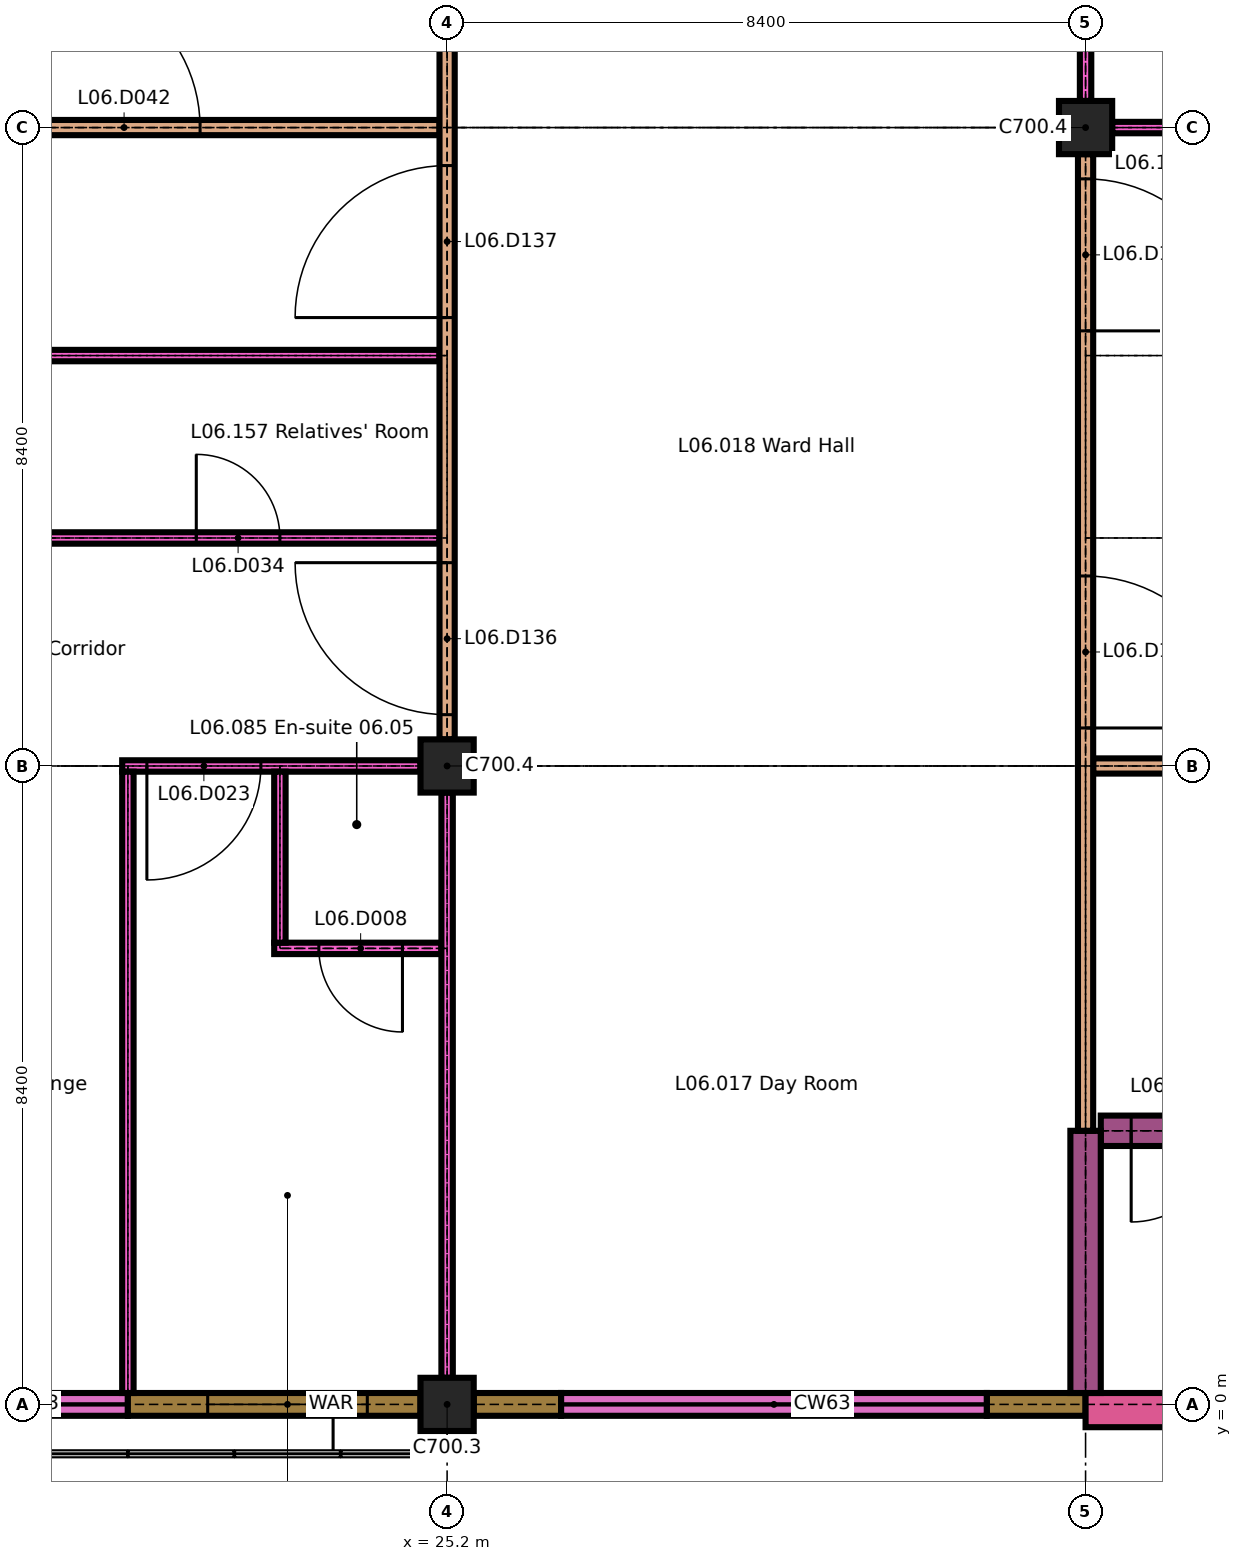
"""IFC4 building model, lengths in metres.
Left out: names, types, materials, properties, quantities, classifications, styles, units other than length and angle.
Written with IfcOpenShell. Run it as: python <this file> out.ifc"""

import sys

from ifc_helpers import new_model, si_unit, direction, frame, frame_2d, origin, origin_2d, place, context, subcontext, project, spatial, rectangle, extrude, element, fill, save


model = new_model("IFC4")
c1 = context("Model", 3, precision=1e-05, world=origin(), true_north=direction((0.0, 1.0)))
c2 = subcontext(c1, "Body", "Model", "MODEL_VIEW")
j1 = project(units=[si_unit("LENGTHUNIT", "METRE"), si_unit("PLANEANGLEUNIT", "RADIAN")], contexts=[c1])
p1 = place(None, origin())
s1 = spatial("IfcSite", under=j1, at=p1, CompositionType="ELEMENT")
p2 = place(p1, origin())
s2 = spatial("IfcBuilding", under=s1, at=p2, CompositionType="ELEMENT")
p3 = place(p2, frame((0.0, 0.0, 26.1)))
s3 = spatial("IfcBuildingStorey", under=s2, at=p3, CompositionType="ELEMENT", Elevation=26.1)
p4 = place(p3, frame((25.2, 0.0, 0.0), z_axis=(0.0, 0.0, 1.0), x_axis=(1.0, 0.0, 0.0)))
e1 = element("IfcColumn", 1, at=p4, inside=s3, PredefinedType="COLUMN", context=c2, shape_type="SweptSolid", body=[
    extrude(rectangle(XDim=0.7, YDim=0.7, at=origin_2d()), origin(), (0.0, 0.0, 1.0), 3.2),
])
for number, where, z_axis, x_axis in (
    (2, (25.2, 8.4, 0.0), (0.0, 0.0, 1.0), (1.0, 0.0, 0.0)),
    (3, (33.6, 16.8, 0.0), (0.0, 0.0, 1.0), (1.0, 0.0, 0.0)),
):
    element("IfcColumn", number, at=place(p3, frame(where, z_axis=z_axis, x_axis=x_axis)), inside=s3, PredefinedType="COLUMN", context=c2, shape_type="SweptSolid", body=[
        extrude(rectangle(XDim=0.7, YDim=0.7, at=origin_2d()), origin(), (0.0, 0.0, 1.0), 3.3),
    ])
p5 = place(p3, frame((17.15, 0.0, 0.0), z_axis=(0.0, 0.0, 1.0), x_axis=(1.0, 0.0, 0.0)))
e4 = element("IfcWall", 4, at=p5, inside=s3, PredefinedType="SOLIDWALL", context=c2, shape_type="SweptSolid", body=[
    extrude(rectangle(XDim=3.85, YDim=0.3, at=frame_2d((1.925, 0.0))), origin(), (0.0, 0.0, 1.0), 0.6),
])
p6 = place(p3, frame((21.0, 0.0, 0.0), z_axis=(0.0, 0.0, 1.0), x_axis=(1.0, 0.0, 0.0)))
e5 = element("IfcWall", 5, at=p6, inside=s3, PredefinedType="SOLIDWALL", context=c2, shape_type="SweptSolid", body=[
    extrude(rectangle(XDim=3.85, YDim=0.3, at=frame_2d((1.925, 0.0))), origin(), (0.0, 0.0, 1.0), 2.9),
])
p7 = place(p6, frame((1.05, 0.0, 0.9)))
e6 = element("IfcOpeningElement", 6, at=p7, cuts=e5, PredefinedType="OPENING", context=c2, shape_type="SweptSolid", body=[
    extrude(rectangle(XDim=2.1, YDim=1.5, at=frame_2d((1.05, 0.75))), frame((0.0, 0.16, 0.0), z_axis=(0.0, -1.0, 0.0), x_axis=(1.0, 0.0, 0.0)), (0.0, 0.0, 1.0), 0.32),
])
p8 = place(p3, frame((25.55, 0.0, 0.0), z_axis=(0.0, 0.0, 1.0), x_axis=(1.0, 0.0, 0.0)))
e7 = element("IfcWall", 7, at=p8, inside=s3, PredefinedType="SOLIDWALL", context=c2, shape_type="SweptSolid", body=[
    extrude(rectangle(XDim=1.15, YDim=0.3, at=frame_2d((0.575, 0.0))), origin(), (0.0, 0.0, 1.0), 2.9),
])
p9 = place(p3, frame((32.3, 0.0, 0.0), z_axis=(0.0, 0.0, 1.0), x_axis=(1.0, 0.0, 0.0)))
e8 = element("IfcWall", 8, at=p9, inside=s3, PredefinedType="SOLIDWALL", context=c2, shape_type="SweptSolid", body=[
    extrude(rectangle(XDim=1.3, YDim=0.3, at=frame_2d((0.65, 0.0))), origin(), (0.0, 0.0, 1.0), 2.9),
])
p10 = place(p3, frame((26.7, 0.0, 0.0), z_axis=(0.0, 0.0, 1.0), x_axis=(1.0, 0.0, 0.0)))
e9 = element("IfcWall", 9, at=p10, inside=s3, PredefinedType="SOLIDWALL", context=c2, shape_type="SweptSolid", body=[
    extrude(rectangle(XDim=5.6, YDim=0.3, at=frame_2d((2.8, 0.0))), origin(), (0.0, 0.0, 1.0), 0.6),
])
p11 = place(p3, frame((33.6, -0.075, 0.0), z_axis=(0.0, 0.0, 1.0), x_axis=(1.0, 0.0, 0.0)))
e10 = element("IfcWall", 10, at=p11, inside=s3, PredefinedType="SOLIDWALL", context=c2, shape_type="SweptSolid", body=[
    extrude(rectangle(XDim=3.15, YDim=0.45, at=frame_2d((1.575, 0.0))), origin(), (0.0, 0.0, 1.0), 3.3),
])
p12 = place(p3, frame((33.8, 3.6, 0.0), z_axis=(0.0, 0.0, 1.0), x_axis=(1.0, 0.0, 0.0)))
e11 = element("IfcWall", 11, at=p12, inside=s3, PredefinedType="SHEAR", context=c2, shape_type="SweptSolid", body=[
    extrude(rectangle(XDim=8.05, YDim=0.4, at=frame_2d((4.025, 0.0))), origin(), (0.0, 0.0, 1.0), 3.3),
])
p13 = place(p12, frame((0.4, 0.0, 0.0)))
e12 = element("IfcOpeningElement", 12, at=p13, cuts=e11, PredefinedType="OPENING", context=c2, shape_type="SweptSolid", body=[
    extrude(rectangle(XDim=1.2, YDim=2.1, at=frame_2d((0.6, 1.05))), frame((0.0, 0.21, 0.0), z_axis=(0.0, -1.0, 0.0), x_axis=(1.0, 0.0, 0.0)), (0.0, 0.0, 1.0), 0.42),
])
p14 = place(p3, frame((22.925, 6.0, 0.0), z_axis=(0.0, 0.0, 1.0), x_axis=(1.0, 0.0, 0.0)))
e13 = element("IfcWall", 13, at=p14, inside=s3, PredefinedType="PARTITIONING", context=c2, shape_type="SweptSolid", body=[
    extrude(rectangle(XDim=2.2, YDim=0.15, at=frame_2d((1.1, 0.0))), origin(), (0.0, 0.0, 1.0), 3.3),
])
p15 = place(p14, frame((0.587, 0.0, 0.0)))
e14 = element("IfcOpeningElement", 14, at=p15, cuts=e13, PredefinedType="OPENING", context=c2, shape_type="SweptSolid", body=[
    extrude(rectangle(XDim=1.1, YDim=2.1, at=frame_2d((0.55, 1.05))), frame((0.0, 0.085, 0.0), z_axis=(0.0, -1.0, 0.0), x_axis=(1.0, 0.0, 0.0)), (0.0, 0.0, 1.0), 0.17),
])
p16 = place(p3, frame((20.925, 8.4, 0.0), z_axis=(0.0, 0.0, 1.0), x_axis=(1.0, 0.0, 0.0)))
e15 = element("IfcWall", 15, at=p16, inside=s3, PredefinedType="PARTITIONING", context=c2, shape_type="SweptSolid", body=[
    extrude(rectangle(XDim=3.925, YDim=0.15, at=frame_2d((1.962, 0.0))), origin(), (0.0, 0.0, 1.0), 3.3),
])
p17 = place(p16, frame((0.325, 0.0, 0.0)))
e16 = element("IfcOpeningElement", 16, at=p17, cuts=e15, PredefinedType="OPENING", context=c2, shape_type="SweptSolid", body=[
    extrude(rectangle(XDim=1.5, YDim=2.4, at=frame_2d((0.75, 1.2))), frame((0.0, 0.085, 0.0), z_axis=(0.0, -1.0, 0.0), x_axis=(1.0, 0.0, 0.0)), (0.0, 0.0, 1.0), 0.17),
])
p18 = place(p3, frame((33.7, 8.4, 0.0), z_axis=(0.0, 0.0, 1.0), x_axis=(1.0, 0.0, 0.0)))
e17 = element("IfcWall", 17, at=p18, inside=s3, PredefinedType="PARTITIONING", context=c2, shape_type="SweptSolid", body=[
    extrude(rectangle(XDim=8.15, YDim=0.2, at=frame_2d((4.075, 0.0))), origin(), (0.0, 0.0, 1.0), 3.3),
])
p19 = place(p18, frame((3.075, 0.0, 0.0)))
e18 = element("IfcOpeningElement", 18, at=p19, cuts=e17, PredefinedType="OPENING", context=c2, shape_type="SweptSolid", body=[
    extrude(rectangle(XDim=2.0, YDim=2.4, at=frame_2d((1.0, 1.2))), frame((0.0, 0.11, 0.0), z_axis=(0.0, -1.0, 0.0), x_axis=(1.0, 0.0, 0.0)), (0.0, 0.0, 1.0), 0.22),
])
p20 = place(p3, frame((19.725, 11.4, 0.0), z_axis=(0.0, 0.0, 1.0), x_axis=(1.0, 0.0, 0.0)))
e19 = element("IfcWall", 19, at=p20, inside=s3, PredefinedType="PARTITIONING", context=c2, shape_type="SweptSolid", body=[
    extrude(rectangle(XDim=5.375, YDim=0.15, at=frame_2d((2.688, 0.0))), origin(), (0.0, 0.0, 1.0), 3.3),
])
p21 = place(p20, frame((2.175, 0.0, 0.0)))
e20 = element("IfcOpeningElement", 20, at=p21, cuts=e19, PredefinedType="OPENING", context=c2, shape_type="SweptSolid", body=[
    extrude(rectangle(XDim=1.1, YDim=2.1, at=frame_2d((0.55, 1.05))), frame((0.0, 0.085, 0.0), z_axis=(0.0, -1.0, 0.0), x_axis=(1.0, 0.0, 0.0)), (0.0, 0.0, 1.0), 0.17),
])
p22 = place(p3, frame((11.325, 13.8, 0.0), z_axis=(0.0, 0.0, 1.0), x_axis=(1.0, 0.0, 0.0)))
e21 = element("IfcWall", 21, at=p22, inside=s3, PredefinedType="PARTITIONING", context=c2, shape_type="SweptSolid", body=[
    extrude(rectangle(XDim=13.775, YDim=0.15, at=frame_2d((6.888, 0.0))), origin(), (0.0, 0.0, 1.0), 3.3),
])
p23 = place(p3, frame((16.7, 16.8, 0.0), z_axis=(0.0, 0.0, 1.0), x_axis=(1.0, 0.0, 0.0)))
e22 = element("IfcWall", 22, at=p23, inside=s3, PredefinedType="PARTITIONING", context=c2, shape_type="SweptSolid", body=[
    extrude(rectangle(XDim=8.4, YDim=0.2, at=frame_2d((4.2, 0.0))), origin(), (0.0, 0.0, 1.0), 3.3),
])
p24 = place(p23, frame((3.25, 0.0, 0.0)))
e23 = element("IfcOpeningElement", 23, at=p24, cuts=e22, PredefinedType="OPENING", context=c2, shape_type="SweptSolid", body=[
    extrude(rectangle(XDim=2.0, YDim=2.4, at=frame_2d((1.0, 1.2))), frame((0.0, 0.11, 0.0), z_axis=(0.0, -1.0, 0.0), x_axis=(1.0, 0.0, 0.0)), (0.0, 0.0, 1.0), 0.22),
])
p25 = place(p3, frame((33.95, 16.8, 0.0), z_axis=(0.0, 0.0, 1.0), x_axis=(1.0, 0.0, 0.0)))
e24 = element("IfcWall", 24, at=p25, inside=s3, PredefinedType="PARTITIONING", context=c2, shape_type="SweptSolid", body=[
    extrude(rectangle(XDim=7.675, YDim=0.15, at=frame_2d((3.837, 0.0))), origin(), (0.0, 0.0, 1.0), 3.3),
])
p26 = place(p25, frame((2.1, 0.0, 0.0)))
e25 = element("IfcOpeningElement", 25, at=p26, cuts=e24, PredefinedType="OPENING", context=c2, shape_type="SweptSolid", body=[
    extrude(rectangle(XDim=1.5, YDim=2.4, at=frame_2d((0.75, 1.2))), frame((0.0, 0.085, 0.0), z_axis=(0.0, -1.0, 0.0), x_axis=(1.0, 0.0, 0.0)), (0.0, 0.0, 1.0), 0.17),
])
p27 = place(p25, frame((4.1, 0.0, 0.0)))
e26 = element("IfcOpeningElement", 26, at=p27, cuts=e24, PredefinedType="OPENING", context=c2, shape_type="SweptSolid", body=[
    extrude(rectangle(XDim=1.5, YDim=2.4, at=frame_2d((0.75, 1.2))), frame((0.0, 0.085, 0.0), z_axis=(0.0, -1.0, 0.0), x_axis=(1.0, 0.0, 0.0)), (0.0, 0.0, 1.0), 0.17),
])
p28 = place(p3, frame((21.0, 0.15, 0.0), z_axis=(0.0, 0.0, 1.0), x_axis=(0.0, 1.0, 0.0)))
e27 = element("IfcWall", 27, at=p28, inside=s3, PredefinedType="PARTITIONING", context=c2, shape_type="SweptSolid", body=[
    extrude(rectangle(XDim=8.175, YDim=0.15, at=frame_2d((4.087, 0.0))), origin(), (0.0, 0.0, 1.0), 3.3),
])
p29 = place(p3, frame((23.0, 6.075, 0.0), z_axis=(0.0, 0.0, 1.0), x_axis=(0.0, 1.0, 0.0)))
e28 = element("IfcWall", 28, at=p29, inside=s3, PredefinedType="PARTITIONING", context=c2, shape_type="SweptSolid", body=[
    extrude(rectangle(XDim=2.25, YDim=0.15, at=frame_2d((1.125, 0.0))), origin(), (0.0, 0.0, 1.0), 3.3),
])
p30 = place(p3, frame((25.2, 0.35, 0.0), z_axis=(0.0, 0.0, 1.0), x_axis=(0.0, 1.0, 0.0)))
e29 = element("IfcWall", 29, at=p30, inside=s3, PredefinedType="PARTITIONING", context=c2, shape_type="SweptSolid", body=[
    extrude(rectangle(XDim=7.7, YDim=0.15, at=frame_2d((3.85, 0.0))), origin(), (0.0, 0.0, 1.0), 3.3),
])
p31 = place(p3, frame((25.2, 8.75, 0.0), z_axis=(0.0, 0.0, 1.0), x_axis=(0.0, 1.0, 0.0)))
e30 = element("IfcWall", 30, at=p31, inside=s3, PredefinedType="PARTITIONING", context=c2, shape_type="SweptSolid", body=[
    extrude(rectangle(XDim=12.85, YDim=0.2, at=frame_2d((6.425, 0.0))), origin(), (0.0, 0.0, 1.0), 3.3),
])
p32 = place(p31, frame((0.325, 0.0, 0.0)))
e31 = element("IfcOpeningElement", 31, at=p32, cuts=e30, PredefinedType="OPENING", context=c2, shape_type="SweptSolid", body=[
    extrude(rectangle(XDim=2.0, YDim=2.4, at=frame_2d((1.0, 1.2))), frame((0.0, 0.11, 0.0), z_axis=(0.0, -1.0, 0.0), x_axis=(1.0, 0.0, 0.0)), (0.0, 0.0, 1.0), 0.22),
])
p33 = place(p31, frame((5.55, 0.0, 0.0)))
e32 = element("IfcOpeningElement", 32, at=p33, cuts=e30, PredefinedType="OPENING", context=c2, shape_type="SweptSolid", body=[
    extrude(rectangle(XDim=2.0, YDim=2.4, at=frame_2d((1.0, 1.2))), frame((0.0, 0.11, 0.0), z_axis=(0.0, -1.0, 0.0), x_axis=(1.0, 0.0, 0.0)), (0.0, 0.0, 1.0), 0.22),
])
p34 = place(p3, frame((33.6, 0.15, 0.0), z_axis=(0.0, 0.0, 1.0), x_axis=(0.0, 1.0, 0.0)))
e33 = element("IfcWall", 33, at=p34, inside=s3, PredefinedType="SHEAR", context=c2, shape_type="SweptSolid", body=[
    extrude(rectangle(XDim=3.45, YDim=0.4, at=frame_2d((1.725, 0.0))), origin(), (0.0, 0.0, 1.0), 3.3),
])
p35 = place(p3, frame((33.6, 3.6, 0.0), z_axis=(0.0, 0.0, 1.0), x_axis=(0.0, 1.0, 0.0)))
e34 = element("IfcWall", 34, at=p35, inside=s3, PredefinedType="PARTITIONING", context=c2, shape_type="SweptSolid", body=[
    extrude(rectangle(XDim=12.85, YDim=0.2, at=frame_2d((6.425, 0.0))), origin(), (0.0, 0.0, 1.0), 3.3),
])
p36 = place(p35, frame((5.3, 0.0, 0.0)))
e35 = element("IfcOpeningElement", 35, at=p36, cuts=e34, PredefinedType="OPENING", context=c2, shape_type="SweptSolid", body=[
    extrude(rectangle(XDim=2.0, YDim=2.4, at=frame_2d((1.0, 1.2))), frame((0.0, 0.11, 0.0), z_axis=(0.0, -1.0, 0.0), x_axis=(1.0, 0.0, 0.0)), (0.0, 0.0, 1.0), 0.22),
])
p37 = place(p35, frame((10.525, 0.0, 0.0)))
e36 = element("IfcOpeningElement", 36, at=p37, cuts=e34, PredefinedType="OPENING", context=c2, shape_type="SweptSolid", body=[
    extrude(rectangle(XDim=2.0, YDim=2.4, at=frame_2d((1.0, 1.2))), frame((0.0, 0.11, 0.0), z_axis=(0.0, -1.0, 0.0), x_axis=(1.0, 0.0, 0.0)), (0.0, 0.0, 1.0), 0.22),
])
p38 = place(p3, frame((33.6, 17.15, 0.0), z_axis=(0.0, 0.0, 1.0), x_axis=(0.0, 1.0, 0.0)))
e37 = element("IfcWall", 37, at=p38, inside=s3, PredefinedType="PARTITIONING", context=c2, shape_type="SweptSolid", body=[
    extrude(rectangle(XDim=7.7, YDim=0.15, at=frame_2d((3.85, 0.0))), origin(), (0.0, 0.0, 1.0), 3.3),
])
p39 = place(p7, origin())
e38 = element("IfcWindow", 38, at=p39, inside=s3, PartitioningType="DOUBLE_PANEL_VERTICAL", PredefinedType="WINDOW", context=c2, shape_type="SweptSolid", body=[
    extrude(rectangle(XDim=2.1, YDim=1.5, at=frame_2d((1.05, 0.75))), frame((0.0, 0.05, 0.0), z_axis=(0.0, -1.0, 0.0), x_axis=(1.0, 0.0, 0.0)), (0.0, 0.0, 1.0), 0.1),
])
fill(e6, e38)
p40 = place(p13, origin())
e39 = element("IfcDoor", 39, at=p40, inside=s3, OperationType="SINGLE_SWING_LEFT", PredefinedType="DOOR", context=c2, shape_type="SweptSolid", body=[
    extrude(rectangle(XDim=1.2, YDim=2.1, at=frame_2d((0.6, 1.05))), frame((0.0, 0.025, 0.0), z_axis=(0.0, -1.0, 0.0), x_axis=(1.0, 0.0, 0.0)), (0.0, 0.0, 1.0), 0.05),
])
fill(e12, e39)
p41 = place(p15, origin())
e40 = element("IfcDoor", 40, at=p41, inside=s3, OperationType="SINGLE_SWING_RIGHT", PredefinedType="DOOR", context=c2, shape_type="SweptSolid", body=[
    extrude(rectangle(XDim=1.1, YDim=2.1, at=frame_2d((0.55, 1.05))), frame((0.0, 0.025, 0.0), z_axis=(0.0, -1.0, 0.0), x_axis=(1.0, 0.0, 0.0)), (0.0, 0.0, 1.0), 0.05),
])
fill(e14, e40)
p42 = place(p17, origin())
e41 = element("IfcDoor", 41, at=p42, inside=s3, OperationType="SINGLE_SWING_LEFT", PredefinedType="DOOR", context=c2, shape_type="SweptSolid", body=[
    extrude(rectangle(XDim=1.5, YDim=2.4, at=frame_2d((0.75, 1.2))), frame((0.0, 0.03, 0.0), z_axis=(0.0, -1.0, 0.0), x_axis=(1.0, 0.0, 0.0)), (0.0, 0.0, 1.0), 0.06),
])
fill(e16, e41)
p43 = place(p21, origin())
e42 = element("IfcDoor", 42, at=p43, inside=s3, OperationType="SINGLE_SWING_RIGHT", PredefinedType="DOOR", context=c2, shape_type="SweptSolid", body=[
    extrude(rectangle(XDim=1.1, YDim=2.1, at=frame_2d((0.55, 1.05))), frame((0.0, 0.025, 0.0), z_axis=(0.0, -1.0, 0.0), x_axis=(1.0, 0.0, 0.0)), (0.0, 0.0, 1.0), 0.05),
])
fill(e20, e42)
p44 = place(p24, origin())
e43 = element("IfcDoor", 43, at=p44, inside=s3, OperationType="SINGLE_SWING_RIGHT", PredefinedType="DOOR", context=c2, shape_type="SweptSolid", body=[
    extrude(rectangle(XDim=2.0, YDim=2.4, at=frame_2d((1.0, 1.2))), frame((0.0, 0.03, 0.0), z_axis=(0.0, -1.0, 0.0), x_axis=(1.0, 0.0, 0.0)), (0.0, 0.0, 1.0), 0.06),
])
fill(e23, e43)
p45 = place(p32, origin())
e44 = element("IfcDoor", 44, at=p45, inside=s3, OperationType="SINGLE_SWING_LEFT", PredefinedType="DOOR", context=c2, shape_type="SweptSolid", body=[
    extrude(rectangle(XDim=2.0, YDim=2.4, at=frame_2d((1.0, 1.2))), frame((0.0, 0.03, 0.0), z_axis=(0.0, -1.0, 0.0), x_axis=(1.0, 0.0, 0.0)), (0.0, 0.0, 1.0), 0.06),
])
fill(e31, e44)
p46 = place(p33, origin())
e45 = element("IfcDoor", 45, at=p46, inside=s3, OperationType="SINGLE_SWING_RIGHT", PredefinedType="DOOR", context=c2, shape_type="SweptSolid", body=[
    extrude(rectangle(XDim=2.0, YDim=2.4, at=frame_2d((1.0, 1.2))), frame((0.0, 0.03, 0.0), z_axis=(0.0, -1.0, 0.0), x_axis=(1.0, 0.0, 0.0)), (0.0, 0.0, 1.0), 0.06),
])
fill(e32, e45)
p47 = place(p36, origin())
e46 = element("IfcDoor", 46, at=p47, inside=s3, OperationType="SINGLE_SWING_LEFT", PredefinedType="DOOR", context=c2, shape_type="SweptSolid", body=[
    extrude(rectangle(XDim=2.0, YDim=2.4, at=frame_2d((1.0, 1.2))), frame((0.0, 0.03, 0.0), z_axis=(0.0, -1.0, 0.0), x_axis=(1.0, 0.0, 0.0)), (0.0, 0.0, 1.0), 0.06),
])
fill(e35, e46)
p48 = place(p37, origin())
e47 = element("IfcDoor", 47, at=p48, inside=s3, OperationType="SINGLE_SWING_LEFT", PredefinedType="DOOR", context=c2, shape_type="SweptSolid", body=[
    extrude(rectangle(XDim=2.0, YDim=2.4, at=frame_2d((1.0, 1.2))), frame((0.0, 0.03, 0.0), z_axis=(0.0, -1.0, 0.0), x_axis=(1.0, 0.0, 0.0)), (0.0, 0.0, 1.0), 0.06),
])
fill(e36, e47)
save(model, sys.argv[1])
